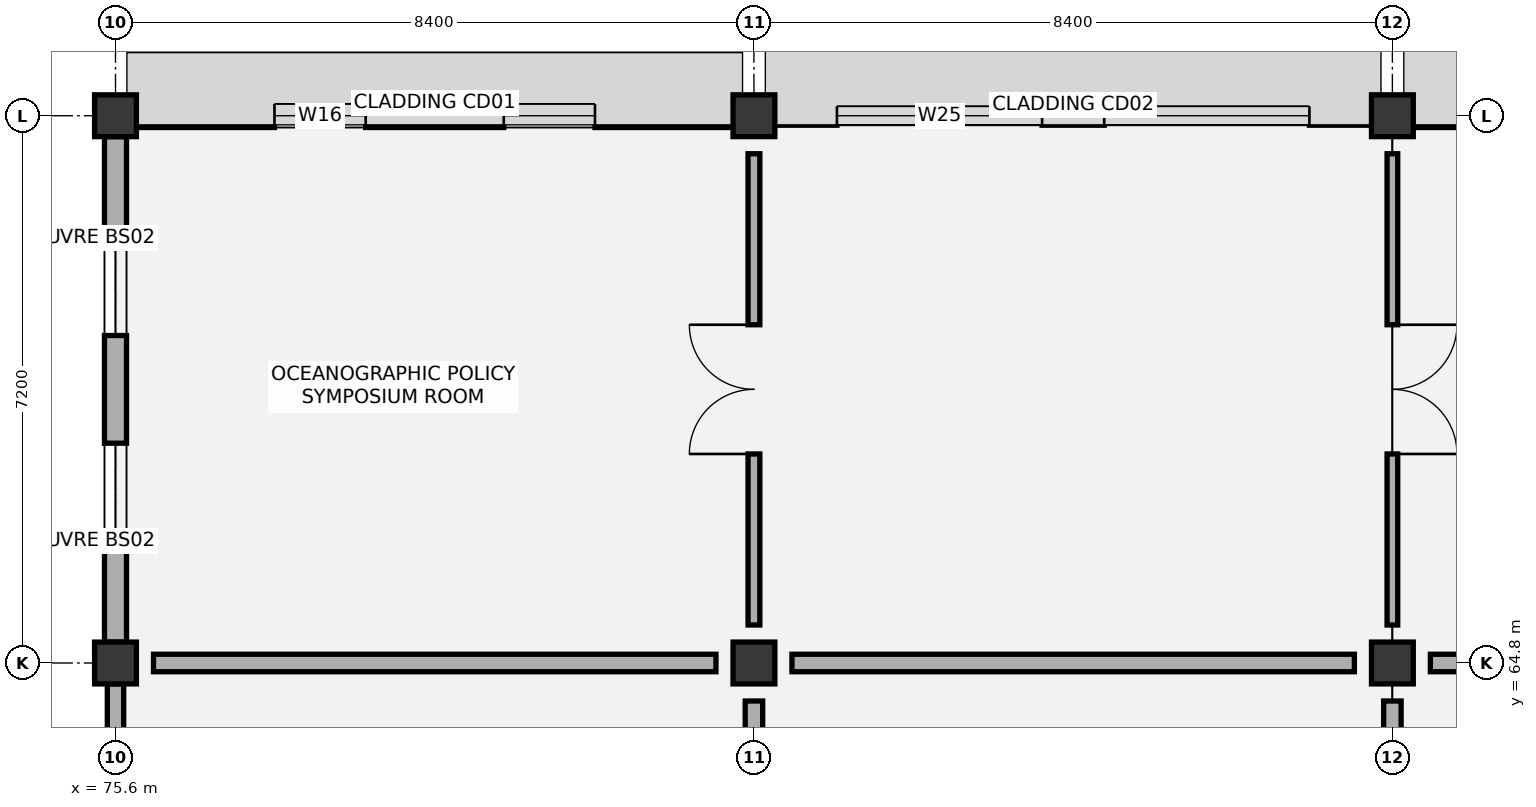
"""IFC4 building model, lengths in metres.
Left out: names, types, materials, properties, quantities, classifications, styles, units other than length and angle.
Written with IfcOpenShell. Run it as: python <this file> out.ifc"""

import sys

from ifc_helpers import new_model, si_unit, direction, frame, frame_2d, origin, origin_2d, place, context, subcontext, project, spatial, rectangle, extrude, element, fill, save


model = new_model("IFC4")
c1 = context("Model", 3, precision=1e-05, world=origin(), true_north=direction((0.0, 1.0)))
c2 = subcontext(c1, "Body", "Model", "MODEL_VIEW")
j1 = project(units=[si_unit("LENGTHUNIT", "METRE"), si_unit("PLANEANGLEUNIT", "RADIAN")], contexts=[c1])
p1 = place(None, origin())
s1 = spatial("IfcSite", under=j1, at=p1, CompositionType="ELEMENT")
p2 = place(p1, origin())
s2 = spatial("IfcBuilding", under=s1, at=p2, CompositionType="ELEMENT")
p3 = place(p2, frame((0.0, 0.0, 60.6)))
s3 = spatial("IfcBuildingStorey", under=s2, at=p3, CompositionType="ELEMENT", Elevation=60.6)
for number, where, z_axis, x_axis in (
    (1, (75.6, 64.8, 0.0), (0.0, 0.0, 1.0), (1.0, 0.0, 0.0)),
    (2, (75.6, 72.0, 0.0), (0.0, 0.0, 1.0), (1.0, 0.0, 0.0)),
    (3, (84.0, 64.8, 0.0), (0.0, 0.0, 1.0), (1.0, 0.0, 0.0)),
    (4, (84.0, 72.0, 0.0), (0.0, 0.0, 1.0), (1.0, 0.0, 0.0)),
    (5, (92.4, 64.8, 0.0), (0.0, 0.0, 1.0), (1.0, 0.0, 0.0)),
    (6, (92.4, 72.0, 0.0), (0.0, 0.0, 1.0), (1.0, 0.0, 0.0)),
):
    element("IfcColumn", number, at=place(p3, frame(where, z_axis=z_axis, x_axis=x_axis)), inside=s3, PredefinedType="COLUMN", context=c2, shape_type="SweptSolid", body=[
        extrude(rectangle(XDim=0.55, YDim=0.55, at=origin_2d()), origin(), (0.0, 0.0, 1.0), 4.2),
    ])
p4 = place(p3, frame((75.6, 57.875, 0.0), z_axis=(0.0, 0.0, 1.0), x_axis=(0.0, 1.0, 0.0)))
e7 = element("IfcWall", 7, at=p4, inside=s3, PredefinedType="SOLIDWALL", context=c2, shape_type="SweptSolid", body=[
    extrude(rectangle(XDim=6.65, YDim=0.215, at=frame_2d((3.325, 0.0))), origin(), (0.0, 0.0, 1.0), 3.395),
])
p5 = place(p4, frame((1.317, 0.0, 0.95)))
e8 = element("IfcOpeningElement", 8, at=p5, cuts=e7, PredefinedType="OPENING", context=c2, shape_type="SweptSolid", body=[
    extrude(rectangle(XDim=1.35, YDim=1.65, at=frame_2d((0.675, 0.825))), frame((0.0, 0.117, 0.0), z_axis=(0.0, -1.0, 0.0), x_axis=(1.0, 0.0, 0.0)), (0.0, 0.0, 1.0), 0.235),
])
p6 = place(p4, frame((3.983, 0.0, 0.95)))
e9 = element("IfcOpeningElement", 9, at=p6, cuts=e7, PredefinedType="OPENING", context=c2, shape_type="SweptSolid", body=[
    extrude(rectangle(XDim=1.35, YDim=1.65, at=frame_2d((0.675, 0.825))), frame((0.0, 0.117, 0.0), z_axis=(0.0, -1.0, 0.0), x_axis=(1.0, 0.0, 0.0)), (0.0, 0.0, 1.0), 0.235),
])
p7 = place(p3, frame((75.875, 72.0, 0.0), z_axis=(0.0, 0.0, 1.0), x_axis=(1.0, 0.0, 0.0)))
e10 = element("IfcWall", 10, at=p7, inside=s3, PredefinedType="SOLIDWALL", context=c2, shape_type="SweptSolid", body=[
    extrude(rectangle(XDim=7.85, YDim=0.31, at=frame_2d((3.925, 0.0))), origin(), (0.0, 0.0, 1.0), 3.445),
])
p8 = place(p7, frame((1.817, 0.0, 0.95)))
e11 = element("IfcOpeningElement", 11, at=p8, cuts=e10, PredefinedType="OPENING", context=c2, shape_type="SweptSolid", body=[
    extrude(rectangle(XDim=1.2, YDim=1.5, at=frame_2d((0.6, 0.75))), frame((0.0, 0.165, 0.0), z_axis=(0.0, -1.0, 0.0), x_axis=(1.0, 0.0, 0.0)), (0.0, 0.0, 1.0), 0.33),
])
p9 = place(p7, frame((4.833, 0.0, 0.95)))
e12 = element("IfcOpeningElement", 12, at=p9, cuts=e10, PredefinedType="OPENING", context=c2, shape_type="SweptSolid", body=[
    extrude(rectangle(XDim=1.2, YDim=1.5, at=frame_2d((0.6, 0.75))), frame((0.0, 0.165, 0.0), z_axis=(0.0, -1.0, 0.0), x_axis=(1.0, 0.0, 0.0)), (0.0, 0.0, 1.0), 0.33),
])
p10 = place(p3, frame((75.6, 65.075, 0.0), z_axis=(0.0, 0.0, 1.0), x_axis=(0.0, 1.0, 0.0)))
e13 = element("IfcWall", 13, at=p10, inside=s3, PredefinedType="SOLIDWALL", context=c2, shape_type="SweptSolid", body=[
    extrude(rectangle(XDim=6.65, YDim=0.29, at=frame_2d((3.325, 0.0))), origin(), (0.0, 0.0, 1.0), 3.445),
])
p11 = place(p10, frame((1.417, 0.0, 0.95)))
e14 = element("IfcOpeningElement", 14, at=p11, cuts=e13, PredefinedType="OPENING", context=c2, shape_type="SweptSolid", body=[
    extrude(rectangle(XDim=1.2, YDim=1.5, at=frame_2d((0.6, 0.75))), frame((0.0, 0.155, 0.0), z_axis=(0.0, -1.0, 0.0), x_axis=(1.0, 0.0, 0.0)), (0.0, 0.0, 1.0), 0.31),
])
p12 = place(p10, frame((4.033, 0.0, 0.95)))
e15 = element("IfcOpeningElement", 15, at=p12, cuts=e13, PredefinedType="OPENING", context=c2, shape_type="SweptSolid", body=[
    extrude(rectangle(XDim=1.2, YDim=1.5, at=frame_2d((0.6, 0.75))), frame((0.0, 0.155, 0.0), z_axis=(0.0, -1.0, 0.0), x_axis=(1.0, 0.0, 0.0)), (0.0, 0.0, 1.0), 0.31),
])
p13 = place(p3, frame((84.275, 72.0, 0.0), z_axis=(0.0, 0.0, 1.0), x_axis=(1.0, 0.0, 0.0)))
e16 = element("IfcWall", 16, at=p13, inside=s3, PredefinedType="SOLIDWALL", context=c2, shape_type="SweptSolid", body=[
    extrude(rectangle(XDim=7.85, YDim=0.25, at=frame_2d((3.925, 0.0))), origin(), (0.0, 0.0, 1.0), 3.445),
])
p14 = place(p13, frame((0.817, 0.0, 0.95)))
e17 = element("IfcOpeningElement", 17, at=p14, cuts=e16, PredefinedType="OPENING", context=c2, shape_type="SweptSolid", body=[
    extrude(rectangle(XDim=2.7, YDim=1.65, at=frame_2d((1.35, 0.825))), frame((0.0, 0.135, 0.0), z_axis=(0.0, -1.0, 0.0), x_axis=(1.0, 0.0, 0.0)), (0.0, 0.0, 1.0), 0.27),
])
p15 = place(p13, frame((4.333, 0.0, 0.95)))
e18 = element("IfcOpeningElement", 18, at=p15, cuts=e16, PredefinedType="OPENING", context=c2, shape_type="SweptSolid", body=[
    extrude(rectangle(XDim=2.7, YDim=1.65, at=frame_2d((1.35, 0.825))), frame((0.0, 0.135, 0.0), z_axis=(0.0, -1.0, 0.0), x_axis=(1.0, 0.0, 0.0)), (0.0, 0.0, 1.0), 0.27),
])
p16 = place(p3, frame((92.675, 72.0, 0.0), z_axis=(0.0, 0.0, 1.0), x_axis=(1.0, 0.0, 0.0)))
e19 = element("IfcWall", 19, at=p16, inside=s3, PredefinedType="SOLIDWALL", context=c2, shape_type="SweptSolid", body=[
    extrude(rectangle(XDim=7.85, YDim=0.31, at=frame_2d((3.925, 0.0))), origin(), (0.0, 0.0, 1.0), 3.445),
])
p17 = place(p16, frame((1.617, 0.0, 0.95)))
e20 = element("IfcOpeningElement", 20, at=p17, cuts=e19, PredefinedType="OPENING", context=c2, shape_type="SweptSolid", body=[
    extrude(rectangle(XDim=1.5, YDim=1.5, at=frame_2d((0.75, 0.75))), frame((0.0, 0.165, 0.0), z_axis=(0.0, -1.0, 0.0), x_axis=(1.0, 0.0, 0.0)), (0.0, 0.0, 1.0), 0.33),
])
p18 = place(p16, frame((4.733, 0.0, 0.95)))
e21 = element("IfcOpeningElement", 21, at=p18, cuts=e19, PredefinedType="OPENING", context=c2, shape_type="SweptSolid", body=[
    extrude(rectangle(XDim=1.5, YDim=1.5, at=frame_2d((0.75, 0.75))), frame((0.0, 0.165, 0.0), z_axis=(0.0, -1.0, 0.0), x_axis=(1.0, 0.0, 0.0)), (0.0, 0.0, 1.0), 0.33),
])
p19 = place(p3, frame((84.0, 58.1, 0.0), z_axis=(0.0, 0.0, 1.0), x_axis=(0.0, 1.0, 0.0)))
e22 = element("IfcWall", 22, at=p19, inside=s3, PredefinedType="PARTITIONING", context=c2, shape_type="SweptSolid", body=[
    extrude(rectangle(XDim=6.2, YDim=0.23, at=frame_2d((3.1, 0.0))), origin(), (0.0, 0.0, 1.0), 3.445),
])
p20 = place(p19, frame((0.25, 0.0, 0.0)))
e23 = element("IfcOpeningElement", 23, at=p20, cuts=e22, PredefinedType="OPENING", context=c2, shape_type="SweptSolid", body=[
    extrude(rectangle(XDim=1.05, YDim=2.15, at=frame_2d((0.525, 1.075))), frame((0.0, 0.125, 0.0), z_axis=(0.0, -1.0, 0.0), x_axis=(1.0, 0.0, 0.0)), (0.0, 0.0, 1.0), 0.25),
])
p21 = place(p3, frame((76.1, 64.8, 0.0), z_axis=(0.0, 0.0, 1.0), x_axis=(1.0, 0.0, 0.0)))
e24 = element("IfcWall", 24, at=p21, inside=s3, PredefinedType="PARTITIONING", context=c2, shape_type="SweptSolid", body=[
    extrude(rectangle(XDim=7.4, YDim=0.23, at=frame_2d((3.7, 0.0))), origin(), (0.0, 0.0, 1.0), 3.545),
])
p22 = place(p3, frame((84.0, 65.3, 0.0), z_axis=(0.0, 0.0, 1.0), x_axis=(0.0, 1.0, 0.0)))
e25 = element("IfcWall", 25, at=p22, inside=s3, PredefinedType="PARTITIONING", context=c2, shape_type="SweptSolid", body=[
    extrude(rectangle(XDim=6.2, YDim=0.155, at=frame_2d((3.1, 0.0))), origin(), (0.0, 0.0, 1.0), 3.705),
])
p23 = place(p22, frame((2.25, 0.0, 0.0)))
e26 = element("IfcOpeningElement", 26, at=p23, cuts=e25, PredefinedType="OPENING", context=c2, shape_type="SweptSolid", body=[
    extrude(rectangle(XDim=1.7, YDim=2.25, at=frame_2d((0.85, 1.125))), frame((0.0, 0.087, 0.0), z_axis=(0.0, -1.0, 0.0), x_axis=(1.0, 0.0, 0.0)), (0.0, 0.0, 1.0), 0.175),
])
p24 = place(p3, frame((92.4, 58.1, 0.0), z_axis=(0.0, 0.0, 1.0), x_axis=(0.0, 1.0, 0.0)))
e27 = element("IfcWall", 27, at=p24, inside=s3, PredefinedType="PARTITIONING", context=c2, shape_type="SweptSolid", body=[
    extrude(rectangle(XDim=6.2, YDim=0.23, at=frame_2d((3.1, 0.0))), origin(), (0.0, 0.0, 1.0), 3.655),
])
p25 = place(p24, frame((0.25, 0.0, 0.0)))
e28 = element("IfcOpeningElement", 28, at=p25, cuts=e27, PredefinedType="OPENING", context=c2, shape_type="SweptSolid", body=[
    extrude(rectangle(XDim=1.05, YDim=2.15, at=frame_2d((0.525, 1.075))), frame((0.0, 0.125, 0.0), z_axis=(0.0, -1.0, 0.0), x_axis=(1.0, 0.0, 0.0)), (0.0, 0.0, 1.0), 0.25),
])
p26 = place(p3, frame((84.5, 64.8, 0.0), z_axis=(0.0, 0.0, 1.0), x_axis=(1.0, 0.0, 0.0)))
e29 = element("IfcWall", 29, at=p26, inside=s3, PredefinedType="PARTITIONING", context=c2, shape_type="SweptSolid", body=[
    extrude(rectangle(XDim=7.4, YDim=0.23, at=frame_2d((3.7, 0.0))), origin(), (0.0, 0.0, 1.0), 3.595),
])
p27 = place(p3, frame((92.4, 65.3, 0.0), z_axis=(0.0, 0.0, 1.0), x_axis=(0.0, 1.0, 0.0)))
e30 = element("IfcWall", 30, at=p27, inside=s3, PredefinedType="PARTITIONING", context=c2, shape_type="SweptSolid", body=[
    extrude(rectangle(XDim=6.2, YDim=0.14, at=frame_2d((3.1, 0.0))), origin(), (0.0, 0.0, 1.0), 3.495),
])
p28 = place(p27, frame((2.25, 0.0, 0.0)))
e31 = element("IfcOpeningElement", 31, at=p28, cuts=e30, PredefinedType="OPENING", context=c2, shape_type="SweptSolid", body=[
    extrude(rectangle(XDim=1.7, YDim=2.25, at=frame_2d((0.85, 1.125))), frame((0.0, 0.08, 0.0), z_axis=(0.0, -1.0, 0.0), x_axis=(1.0, 0.0, 0.0)), (0.0, 0.0, 1.0), 0.16),
])
p29 = place(p3, frame((92.9, 64.8, 0.0), z_axis=(0.0, 0.0, 1.0), x_axis=(1.0, 0.0, 0.0)))
e32 = element("IfcWall", 32, at=p29, inside=s3, PredefinedType="PARTITIONING", context=c2, shape_type="SweptSolid", body=[
    extrude(rectangle(XDim=7.4, YDim=0.23, at=frame_2d((3.7, 0.0))), origin(), (0.0, 0.0, 1.0), 3.655),
])
p30 = place(p8, origin())
e33 = element("IfcWindow", 33, at=p30, inside=s3, PartitioningType="SINGLE_PANEL", PredefinedType="WINDOW", context=c2, shape_type="SweptSolid", body=[
    extrude(rectangle(XDim=1.2, YDim=1.5, at=frame_2d((0.6, 0.75))), frame((0.0, 0.03, 0.0), z_axis=(0.0, -1.0, 0.0), x_axis=(1.0, 0.0, 0.0)), (0.0, 0.0, 1.0), 0.06),
])
fill(e11, e33)
p31 = place(p9, origin())
e34 = element("IfcWindow", 34, at=p31, inside=s3, PartitioningType="SINGLE_PANEL", PredefinedType="WINDOW", context=c2, shape_type="SweptSolid", body=[
    extrude(rectangle(XDim=1.2, YDim=1.5, at=frame_2d((0.6, 0.75))), frame((0.0, 0.03, 0.0), z_axis=(0.0, -1.0, 0.0), x_axis=(1.0, 0.0, 0.0)), (0.0, 0.0, 1.0), 0.06),
])
fill(e12, e34)
p32 = place(p11, origin())
e35 = element("IfcWindow", 35, at=p32, inside=s3, PartitioningType="SINGLE_PANEL", PredefinedType="WINDOW", context=c2, shape_type="SweptSolid", body=[
    extrude(rectangle(XDim=1.2, YDim=1.5, at=frame_2d((0.6, 0.75))), frame((0.0, 0.03, 0.0), z_axis=(0.0, -1.0, 0.0), x_axis=(1.0, 0.0, 0.0)), (0.0, 0.0, 1.0), 0.06),
])
fill(e14, e35)
p33 = place(p12, origin())
e36 = element("IfcWindow", 36, at=p33, inside=s3, PartitioningType="SINGLE_PANEL", PredefinedType="WINDOW", context=c2, shape_type="SweptSolid", body=[
    extrude(rectangle(XDim=1.2, YDim=1.5, at=frame_2d((0.6, 0.75))), frame((0.0, 0.03, 0.0), z_axis=(0.0, -1.0, 0.0), x_axis=(1.0, 0.0, 0.0)), (0.0, 0.0, 1.0), 0.06),
])
fill(e15, e36)
p34 = place(p14, origin())
e37 = element("IfcWindow", 37, at=p34, inside=s3, PartitioningType="SINGLE_PANEL", PredefinedType="WINDOW", context=c2, shape_type="SweptSolid", body=[
    extrude(rectangle(XDim=2.7, YDim=1.65, at=frame_2d((1.35, 0.825))), frame((0.0, 0.03, 0.0), z_axis=(0.0, -1.0, 0.0), x_axis=(1.0, 0.0, 0.0)), (0.0, 0.0, 1.0), 0.06),
])
fill(e17, e37)
p35 = place(p15, origin())
e38 = element("IfcWindow", 38, at=p35, inside=s3, PartitioningType="SINGLE_PANEL", PredefinedType="WINDOW", context=c2, shape_type="SweptSolid", body=[
    extrude(rectangle(XDim=2.7, YDim=1.65, at=frame_2d((1.35, 0.825))), frame((0.0, 0.03, 0.0), z_axis=(0.0, -1.0, 0.0), x_axis=(1.0, 0.0, 0.0)), (0.0, 0.0, 1.0), 0.06),
])
fill(e18, e38)
p36 = place(p23, origin())
e39 = element("IfcDoor", 39, at=p36, inside=s3, OperationType="DOUBLE_DOOR_SINGLE_SWING", PredefinedType="DOOR", context=c2, shape_type="SweptSolid", body=[
    extrude(rectangle(XDim=1.7, YDim=2.25, at=frame_2d((0.85, 1.125))), frame((0.0, 0.025, 0.0), z_axis=(0.0, -1.0, 0.0), x_axis=(1.0, 0.0, 0.0)), (0.0, 0.0, 1.0), 0.05),
])
fill(e26, e39)
p37 = place(p28, frame((1.7, 0.0, 0.0), z_axis=(0.0, 0.0, 1.0), x_axis=(-1.0, 0.0, 0.0)))
e40 = element("IfcDoor", 40, at=p37, inside=s3, OperationType="DOUBLE_DOOR_SINGLE_SWING", PredefinedType="DOOR", context=c2, shape_type="SweptSolid", body=[
    extrude(rectangle(XDim=1.7, YDim=2.25, at=frame_2d((0.85, 1.125))), frame((0.0, 0.025, 0.0), z_axis=(0.0, -1.0, 0.0), x_axis=(1.0, 0.0, 0.0)), (0.0, 0.0, 1.0), 0.05),
])
fill(e31, e40)
save(model, sys.argv[1])
